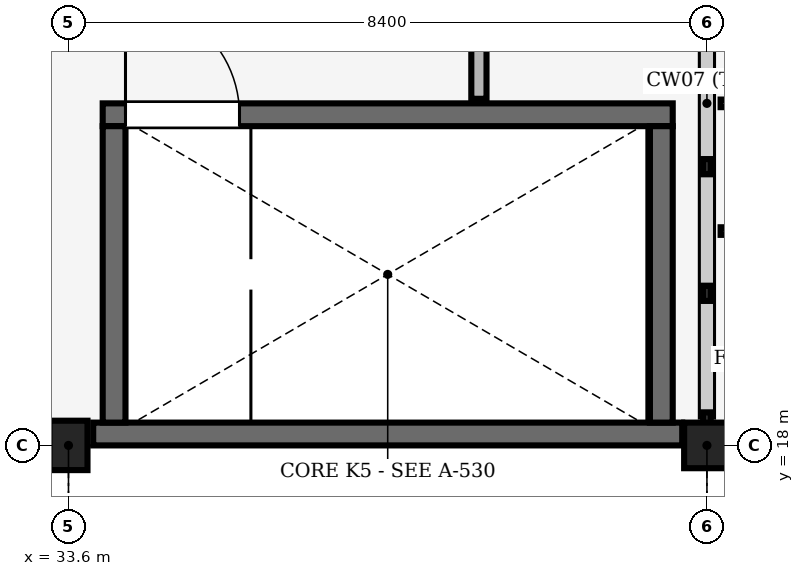
"""IFC4 building model, lengths in metres.
Left out: names, types, materials, properties, quantities, classifications, styles, units other than length and angle.
Written with IfcOpenShell. Run it as: python <this file> out.ifc"""

import sys

from ifc_helpers import new_model, si_unit, direction, frame, frame_2d, origin, origin_2d, place, context, subcontext, project, spatial, rectangle, extrude, element, fill, save


model = new_model("IFC4")
c1 = context("Model", 3, precision=1e-05, world=origin(), true_north=direction((0.0, 1.0)))
c2 = subcontext(c1, "Body", "Model", "MODEL_VIEW")
j1 = project(units=[si_unit("LENGTHUNIT", "METRE"), si_unit("PLANEANGLEUNIT", "RADIAN")], contexts=[c1])
p1 = place(None, origin())
s1 = spatial("IfcSite", under=j1, at=p1, CompositionType="ELEMENT")
p2 = place(p1, origin())
s2 = spatial("IfcBuilding", under=s1, at=p2, CompositionType="ELEMENT")
p3 = place(p2, frame((0.0, 0.0, 4.8)))
s3 = spatial("IfcBuildingStorey", under=s2, at=p3, CompositionType="ELEMENT", Elevation=4.8)
p4 = place(p3, frame((33.6, 18.0, 0.0), z_axis=(0.0, 0.0, 1.0), x_axis=(1.0, 0.0, 0.0)))
e1 = element("IfcColumn", 1, at=p4, inside=s3, PredefinedType="COLUMN", context=c2, shape_type="SweptSolid", body=[
    extrude(rectangle(XDim=0.5, YDim=0.65, at=origin_2d()), origin(), (0.0, 0.0, 1.0), 4.2),
])
p5 = place(p3, frame((42.0, 18.0, 0.0), z_axis=(0.0, 0.0, 1.0), x_axis=(1.0, 0.0, 0.0)))
e2 = element("IfcColumn", 2, at=p5, inside=s3, PredefinedType="COLUMN", context=c2, shape_type="SweptSolid", body=[
    extrude(rectangle(XDim=0.6, YDim=0.6, at=origin_2d()), origin(), (0.0, 0.0, 1.0), 4.2),
])
p6 = place(p3, frame((33.925, 18.15, 0.0), z_axis=(0.0, 0.0, 1.0), x_axis=(1.0, 0.0, 0.0)))
e3 = element("IfcWall", 3, at=p6, inside=s3, PredefinedType="SHEAR", context=c2, shape_type="SweptSolid", body=[
    extrude(rectangle(XDim=7.75, YDim=0.3, at=frame_2d((3.875, 0.0))), origin(), (0.0, 0.0, 1.0), 4.025),
])
p7 = place(p3, frame((34.05, 22.35, 0.0), z_axis=(0.0, 0.0, 1.0), x_axis=(1.0, 0.0, 0.0)))
e4 = element("IfcWall", 4, at=p7, inside=s3, PredefinedType="SHEAR", context=c2, shape_type="SweptSolid", body=[
    extrude(rectangle(XDim=7.5, YDim=0.3, at=frame_2d((3.75, 0.0))), origin(), (0.0, 0.0, 1.0), 4.025),
])
p8 = place(p7, frame((0.3, 0.0, 0.0)))
e5 = element("IfcOpeningElement", 5, at=p8, cuts=e4, PredefinedType="OPENING", context=c2, shape_type="SweptSolid", body=[
    extrude(rectangle(XDim=1.5, YDim=2.2, at=frame_2d((0.75, 1.1))), frame((0.0, 0.16, 0.0), z_axis=(0.0, -1.0, 0.0), x_axis=(1.0, 0.0, 0.0)), (0.0, 0.0, 1.0), 0.32),
])
for number, where, z_axis, x_axis in (
    (6, (34.2, 18.3, 0.0), (0.0, 0.0, 1.0), (0.0, 1.0, 0.0)),
    (7, (41.4, 18.3, 0.0), (0.0, 0.0, 1.0), (0.0, 1.0, 0.0)),
):
    element("IfcWall", number, at=place(p3, frame(where, z_axis=z_axis, x_axis=x_axis)), inside=s3, PredefinedType="SHEAR", context=c2, shape_type="SweptSolid", body=[
        extrude(rectangle(XDim=3.9, YDim=0.3, at=frame_2d((1.95, 0.0))), origin(), (0.0, 0.0, 1.0), 4.025),
    ])
p9 = place(p3, frame((39.0, 22.56, 0.0), z_axis=(0.0, 0.0, 1.0), x_axis=(0.0, 1.0, 0.0)))
e8 = element("IfcWall", 8, at=p9, inside=s3, PredefinedType="PARTITIONING", context=c2, shape_type="SweptSolid", body=[
    extrude(rectangle(XDim=29.535, YDim=0.2, at=frame_2d((14.768, 0.0))), origin(), (0.0, 0.0, 1.0), 3.9),
])
p10 = place(p9, frame((6.465, 0.0, 0.0)))
e9 = element("IfcOpeningElement", 9, at=p10, cuts=e8, PredefinedType="OPENING", context=c2, shape_type="SweptSolid", body=[
    extrude(rectangle(XDim=1.7, YDim=2.25, at=frame_2d((0.85, 1.125))), frame((0.0, 0.11, 0.0), z_axis=(0.0, -1.0, 0.0), x_axis=(1.0, 0.0, 0.0)), (0.0, 0.0, 1.0), 0.22),
])
p11 = place(p9, frame((21.64, 0.0, 0.0)))
e10 = element("IfcOpeningElement", 10, at=p11, cuts=e8, PredefinedType="OPENING", context=c2, shape_type="SweptSolid", body=[
    extrude(rectangle(XDim=1.9, YDim=2.4, at=frame_2d((0.95, 1.2))), frame((0.0, 0.11, 0.0), z_axis=(0.0, -1.0, 0.0), x_axis=(1.0, 0.0, 0.0)), (0.0, 0.0, 1.0), 0.22),
])
p12 = place(p8, origin())
e11 = element("IfcDoor", 11, at=p12, inside=s3, OperationType="DOUBLE_DOOR_SINGLE_SWING", PredefinedType="DOOR", context=c2, shape_type="SweptSolid", body=[
    extrude(rectangle(XDim=1.5, YDim=2.2, at=frame_2d((0.75, 1.1))), frame((0.0, 0.025, 0.0), z_axis=(0.0, -1.0, 0.0), x_axis=(1.0, 0.0, 0.0)), (0.0, 0.0, 1.0), 0.05),
])
fill(e5, e11)
save(model, sys.argv[1])
